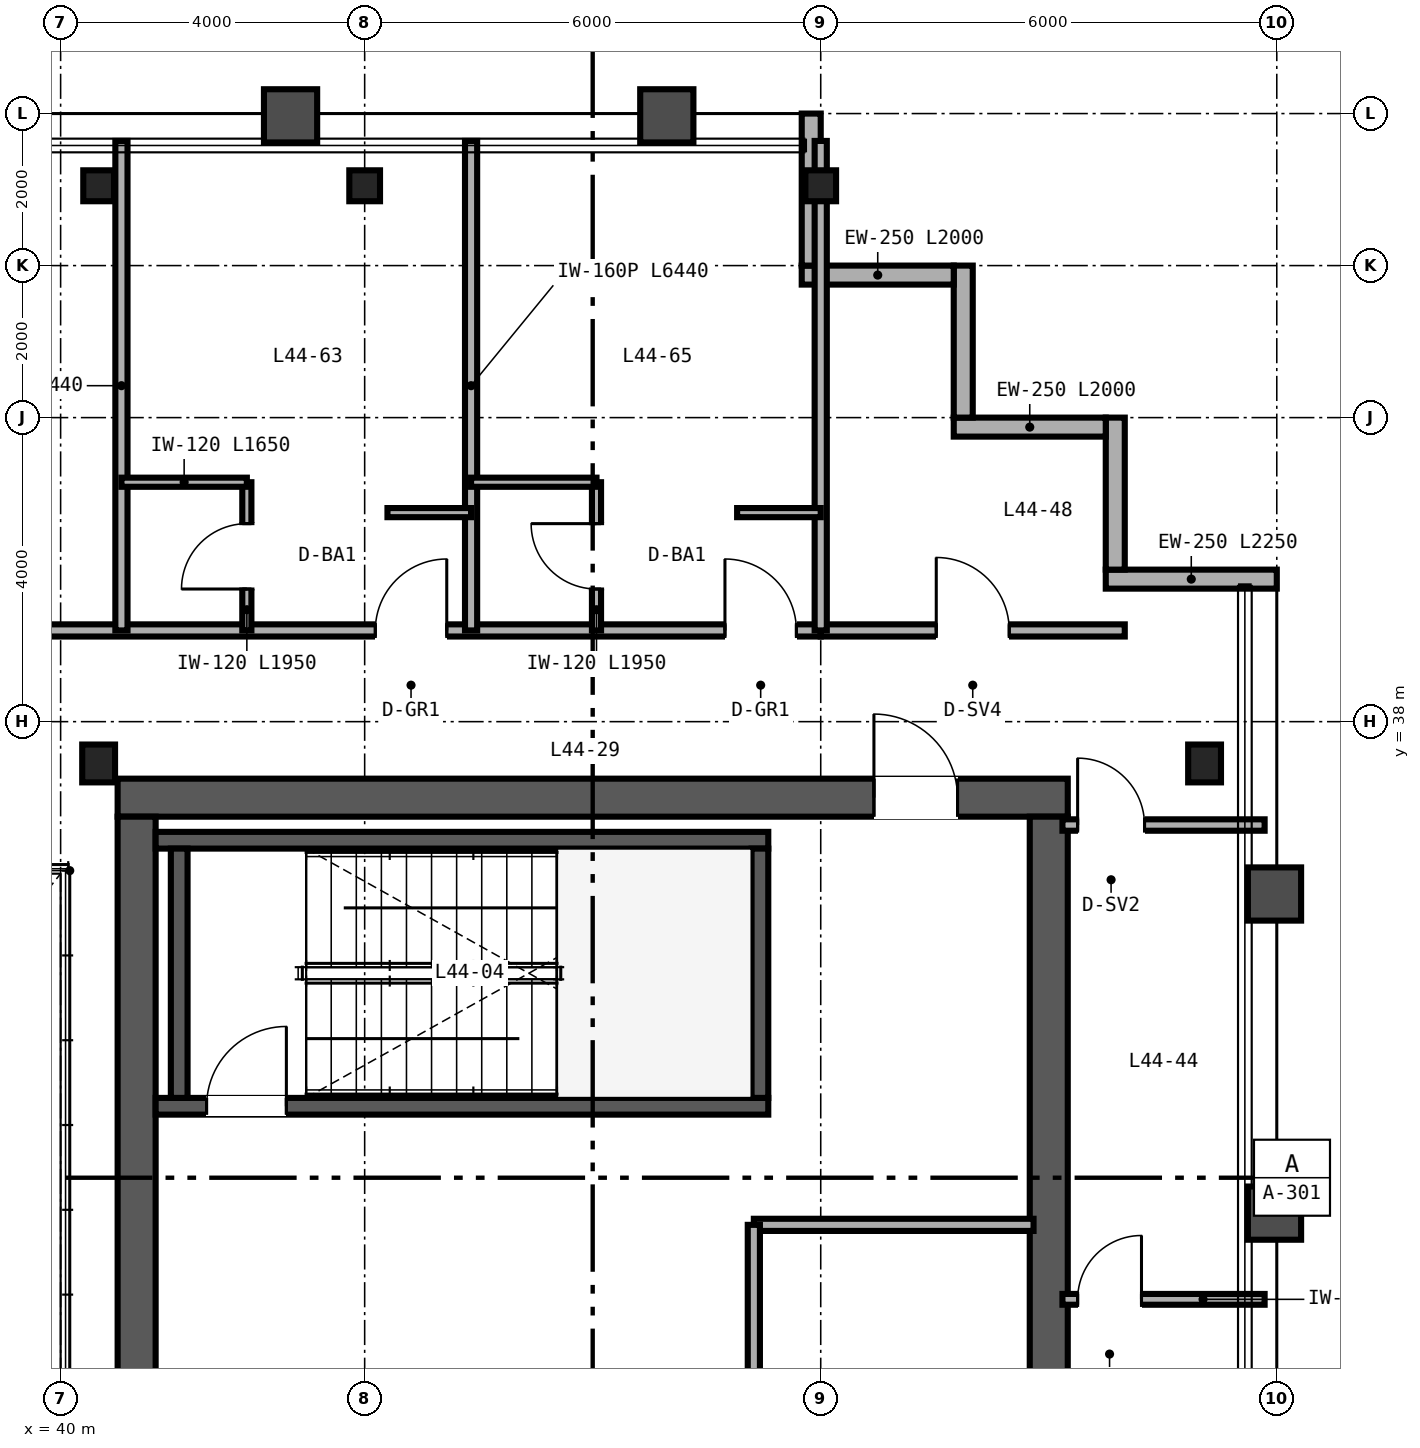
"""IFC4 building model, lengths in metres.
Left out: names, types, materials, properties, quantities, classifications, styles, units other than length and angle.
Written with IfcOpenShell. Run it as: python <this file> out.ifc"""

import sys

from ifc_helpers import new_model, si_unit, direction, frame, frame_2d, origin, origin_2d, place, context, subcontext, project, spatial, rectangle, i_section, extrude, source, transform, mapped, element, fill, save


model = new_model("IFC4")
c1 = context("Model", 3, precision=1e-05, world=origin(), true_north=direction((0.0, 1.0)))
c2 = subcontext(c1, "Body", "Model", "MODEL_VIEW")
j1 = project(units=[si_unit("LENGTHUNIT", "METRE"), si_unit("PLANEANGLEUNIT", "RADIAN")], contexts=[c1])
p1 = place(None, origin())
s1 = spatial("IfcSite", under=j1, at=p1, CompositionType="ELEMENT")
p2 = place(p1, origin())
s2 = spatial("IfcBuilding", under=s1, at=p2, CompositionType="ELEMENT")
p3 = place(p2, frame((0.0, 0.0, 177.6)))
s3 = spatial("IfcBuildingStorey", under=s2, at=p3, CompositionType="ELEMENT", Elevation=177.6)
p4 = place(p3, frame((40.75, 37.0, 0.0), z_axis=(0.0, 0.0, 1.0), x_axis=(1.0, 0.0, 0.0)))
e1 = element("IfcWall", 1, at=p4, inside=s3, PredefinedType="SHEAR", context=c2, shape_type="SweptSolid", body=[
    extrude(rectangle(XDim=12.5, YDim=0.5, at=frame_2d((6.25, 0.0))), origin(), (0.0, 0.0, 1.0), 3.37),
])
p5 = place(p4, frame((9.95, 0.0, 0.0)))
e2 = element("IfcOpeningElement", 2, at=p5, cuts=e1, PredefinedType="OPENING", context=c2, shape_type="SweptSolid", body=[
    extrude(rectangle(XDim=1.1, YDim=2.15, at=frame_2d((0.55, 1.075))), frame((0.0, 0.26, 0.0), z_axis=(0.0, -1.0, 0.0), x_axis=(1.0, 0.0, 0.0)), (0.0, 0.0, 1.0), 0.52),
])
for number, where, z_axis, x_axis in (
    (3, (41.0, 15.25, 0.0), (0.0, 0.0, 1.0), (0.0, 1.0, 0.0)),
    (4, (53.0, 15.25, 0.0), (0.0, 0.0, 1.0), (0.0, 1.0, 0.0)),
):
    element("IfcWall", number, at=place(p3, frame(where, z_axis=z_axis, x_axis=x_axis)), inside=s3, PredefinedType="SHEAR", context=c2, shape_type="SweptSolid", body=[
        extrude(rectangle(XDim=21.5, YDim=0.5, at=frame_2d((10.75, 0.0))), origin(), (0.0, 0.0, 1.0), 3.37),
    ])
p6 = place(p3, frame((41.25, 32.94, 0.0), z_axis=(0.0, 0.0, 1.0), x_axis=(1.0, 0.0, 0.0)))
e5 = element("IfcWall", 5, at=p6, inside=s3, PredefinedType="SHEAR", context=c2, shape_type="SweptSolid", body=[
    extrude(rectangle(XDim=8.06, YDim=0.22, at=frame_2d((4.03, 0.0))), origin(), (0.0, 0.0, 1.0), 3.4),
])
p7 = place(p6, frame((0.67, 0.0, 0.0)))
e6 = element("IfcOpeningElement", 6, at=p7, cuts=e5, PredefinedType="OPENING", context=c2, shape_type="SweptSolid", body=[
    extrude(rectangle(XDim=1.05, YDim=2.15, at=frame_2d((0.525, 1.075))), frame((0.0, 0.12, 0.0), z_axis=(0.0, -1.0, 0.0), x_axis=(1.0, 0.0, 0.0)), (0.0, 0.0, 1.0), 0.24),
])
p8 = place(p3, frame((41.25, 36.44, 0.0), z_axis=(0.0, 0.0, 1.0), x_axis=(1.0, 0.0, 0.0)))
e7 = element("IfcWall", 7, at=p8, inside=s3, PredefinedType="SHEAR", context=c2, shape_type="SweptSolid", body=[
    extrude(rectangle(XDim=8.06, YDim=0.22, at=frame_2d((4.03, 0.0))), origin(), (0.0, 0.0, 1.0), 3.4),
])
for number, where, z_axis, x_axis in (
    (8, (41.56, 33.05, 0.0), (0.0, 0.0, 1.0), (0.0, 1.0, 0.0)),
    (9, (49.2, 33.05, 0.0), (0.0, 0.0, 1.0), (0.0, 1.0, 0.0)),
):
    element("IfcWall", number, at=place(p3, frame(where, z_axis=z_axis, x_axis=x_axis)), inside=s3, PredefinedType="SHEAR", context=c2, shape_type="SweptSolid", body=[
        extrude(rectangle(XDim=3.28, YDim=0.22, at=frame_2d((1.64, 0.0))), origin(), (0.0, 0.0, 1.0), 3.4),
    ])
m1 = source(origin(), c2, "Body", "SweptSolid", [
    extrude(i_section(OverallWidth=0.432, OverallDepth=0.498, WebThickness=0.056, FlangeThickness=0.089, FilletRadius=0.025, at=origin_2d()), origin(), (0.0, 0.0, 1.0), 3.37),
])
for number, where, z_axis, x_axis in (
    (10, (40.5, 37.45, 0.0), (0.0, 0.0, 1.0), (1.0, 0.0, 0.0)),
    (11, (55.05, 37.45, 0.0), (0.0, 0.0, 1.0), (1.0, 0.0, 0.0)),
):
    element("IfcColumn", number, at=place(p3, frame(where, z_axis=z_axis, x_axis=x_axis)), inside=s3, PredefinedType="COLUMN", context=c2, shape_type="MappedRepresentation", body=[
        mapped(m1, transform((0.0, 0.0, 0.0), scale=1.0)),
    ])
m2 = source(origin(), c2, "Body", "SweptSolid", [
    extrude(i_section(OverallWidth=0.404, OverallDepth=0.407, WebThickness=0.027, FlangeThickness=0.044, FilletRadius=0.025, at=origin_2d()), origin(), (0.0, 0.0, 1.0), 3.37),
])
for number, where, z_axis, x_axis in (
    (12, (40.5, 45.05, 0.0), (0.0, 0.0, 1.0), (1.0, 0.0, 0.0)),
    (13, (44.0, 45.05, 0.0), (0.0, 0.0, 1.0), (1.0, 0.0, 0.0)),
    (14, (50.0, 45.05, 0.0), (0.0, 0.0, 1.0), (1.0, 0.0, 0.0)),
):
    element("IfcColumn", number, at=place(p3, frame(where, z_axis=z_axis, x_axis=x_axis)), inside=s3, PredefinedType="COLUMN", context=c2, shape_type="MappedRepresentation", body=[
        mapped(m2, transform((0.0, 0.0, 0.0), scale=1.0)),
    ])
p9 = place(p3, frame((56.0, 39.875, 0.0), z_axis=(0.0, 0.0, 1.0), x_axis=(-1.0, 0.0, 0.0)))
e15 = element("IfcWall", 15, at=p9, inside=s3, PredefinedType="SOLIDWALL", context=c2, shape_type="SweptSolid", body=[
    extrude(rectangle(XDim=2.25, YDim=0.25, at=frame_2d((1.125, 0.0))), origin(), (0.0, 0.0, 1.0), 3.37),
])
for number, where, z_axis, x_axis in (
    (16, (53.875, 40.0, 0.0), (0.0, 0.0, 1.0), (0.0, 1.0, 0.0)),
    (17, (53.75, 41.875, 0.0), (0.0, 0.0, 1.0), (-1.0, 0.0, 0.0)),
    (18, (51.875, 42.0, 0.0), (0.0, 0.0, 1.0), (0.0, 1.0, 0.0)),
    (19, (51.75, 43.875, 0.0), (0.0, 0.0, 1.0), (-1.0, 0.0, 0.0)),
):
    element("IfcWall", number, at=place(p3, frame(where, z_axis=z_axis, x_axis=x_axis)), inside=s3, PredefinedType="SOLIDWALL", context=c2, shape_type="SweptSolid", body=[
        extrude(rectangle(XDim=2.0, YDim=0.25, at=frame_2d((1.0, 0.0))), origin(), (0.0, 0.0, 1.0), 3.37),
    ])
p10 = place(p3, frame((49.875, 44.0, 0.0), z_axis=(0.0, 0.0, 1.0), x_axis=(0.0, 1.0, 0.0)))
e20 = element("IfcWall", 20, at=p10, inside=s3, PredefinedType="SOLIDWALL", context=c2, shape_type="SweptSolid", body=[
    extrude(rectangle(XDim=2.0, YDim=0.25, at=frame_2d((1.0, 0.0))), origin(), (0.0, 0.0, 1.0), 2.677),
])
p11 = place(p3, frame((49.12, 31.38, 0.0), z_axis=(0.0, 0.0, 1.0), x_axis=(1.0, 0.0, 0.0)))
e21 = element("IfcWall", 21, at=p11, inside=s3, PredefinedType="PARTITIONING", context=c2, shape_type="SweptSolid", body=[
    extrude(rectangle(XDim=3.68, YDim=0.16, at=frame_2d((1.84, 0.0))), origin(), (0.0, 0.0, 1.0), 2.47),
])
p12 = place(p3, frame((49.12, 15.25, 0.0), z_axis=(0.0, 0.0, 1.0), x_axis=(0.0, 1.0, 0.0)))
e22 = element("IfcWall", 22, at=p12, inside=s3, PredefinedType="PARTITIONING", context=c2, shape_type="SweptSolid", body=[
    extrude(rectangle(XDim=16.13, YDim=0.16, at=frame_2d((8.065, 0.0))), origin(), (0.0, 0.0, 1.0), 2.443),
])
p13 = place(p12, frame((3.8, 0.0, 0.0)))
e23 = element("IfcOpeningElement", 23, at=p13, cuts=e22, PredefinedType="OPENING", context=c2, shape_type="SweptSolid", body=[
    extrude(rectangle(XDim=0.92, YDim=2.15, at=frame_2d((0.46, 1.075))), frame((0.0, 0.09, 0.0), z_axis=(0.0, -1.0, 0.0), x_axis=(1.0, 0.0, 0.0)), (0.0, 0.0, 1.0), 0.18),
])
p14 = place(p12, frame((11.8, 0.0, 0.0)))
e24 = element("IfcOpeningElement", 24, at=p14, cuts=e22, PredefinedType="OPENING", context=c2, shape_type="SweptSolid", body=[
    extrude(rectangle(XDim=0.9, YDim=2.15, at=frame_2d((0.45, 1.075))), frame((0.0, 0.09, 0.0), z_axis=(0.0, -1.0, 0.0), x_axis=(1.0, 0.0, 0.0)), (0.0, 0.0, 1.0), 0.18),
])
p15 = place(p3, frame((53.18, 36.64, 0.0), z_axis=(0.0, 0.0, 1.0), x_axis=(1.0, 0.0, 0.0)))
e25 = element("IfcWall", 25, at=p15, inside=s3, PredefinedType="PARTITIONING", context=c2, shape_type="SweptSolid", body=[
    extrude(rectangle(XDim=2.66, YDim=0.15, at=frame_2d((1.33, 0.0))), origin(), (0.0, 0.0, 1.0), 2.753),
])
p16 = place(p15, frame((0.2, 0.0, 0.0)))
e26 = element("IfcOpeningElement", 26, at=p16, cuts=e25, PredefinedType="OPENING", context=c2, shape_type="SweptSolid", body=[
    extrude(rectangle(XDim=0.88, YDim=2.15, at=frame_2d((0.44, 1.075))), frame((0.0, 0.085, 0.0), z_axis=(0.0, -1.0, 0.0), x_axis=(1.0, 0.0, 0.0)), (0.0, 0.0, 1.0), 0.17),
])
p17 = place(p3, frame((53.18, 30.4, 0.0), z_axis=(0.0, 0.0, 1.0), x_axis=(1.0, 0.0, 0.0)))
e27 = element("IfcWall", 27, at=p17, inside=s3, PredefinedType="PARTITIONING", context=c2, shape_type="SweptSolid", body=[
    extrude(rectangle(XDim=2.66, YDim=0.142, at=frame_2d((1.33, 0.0))), origin(), (0.0, 0.0, 1.0), 2.753),
])
p18 = place(p17, frame((0.2, 0.0, 0.0)))
e28 = element("IfcOpeningElement", 28, at=p18, cuts=e27, PredefinedType="OPENING", context=c2, shape_type="SweptSolid", body=[
    extrude(rectangle(XDim=0.84, YDim=2.1, at=frame_2d((0.42, 1.05))), frame((0.0, 0.081, 0.0), z_axis=(0.0, -1.0, 0.0), x_axis=(1.0, 0.0, 0.0)), (0.0, 0.0, 1.0), 0.162),
])
p19 = place(p3, frame((50.0, 39.2, 0.0), z_axis=(0.0, 0.0, 1.0), x_axis=(1.0, 0.0, 0.0)))
e29 = element("IfcWall", 29, at=p19, inside=s3, PredefinedType="PARTITIONING", context=c2, shape_type="SweptSolid", body=[
    extrude(rectangle(XDim=4.0, YDim=0.16, at=frame_2d((2.0, 0.0))), origin(), (0.0, 0.0, 1.0), 3.37),
])
p20 = place(p19, frame((1.52, 0.0, 0.0)))
e30 = element("IfcOpeningElement", 30, at=p20, cuts=e29, PredefinedType="OPENING", context=c2, shape_type="SweptSolid", body=[
    extrude(rectangle(XDim=0.96, YDim=2.15, at=frame_2d((0.48, 1.075))), frame((0.0, 0.09, 0.0), z_axis=(0.0, -1.0, 0.0), x_axis=(1.0, 0.0, 0.0)), (0.0, 0.0, 1.0), 0.18),
])
p21 = place(p3, frame((14.0, 39.2, 0.0), z_axis=(0.0, 0.0, 1.0), x_axis=(1.0, 0.0, 0.0)))
e31 = element("IfcWall", 31, at=p21, inside=s3, PredefinedType="PARTITIONING", context=c2, shape_type="SweptSolid", body=[
    extrude(rectangle(XDim=36.0, YDim=0.16, at=frame_2d((18.0, 0.0))), origin(), (0.0, 0.0, 1.0), 2.913),
])
p22 = place(p21, frame((7.5, 0.0, 0.0)))
e32 = element("IfcOpeningElement", 32, at=p22, cuts=e31, PredefinedType="OPENING", context=c2, shape_type="SweptSolid", body=[
    extrude(rectangle(XDim=0.98, YDim=2.2, at=frame_2d((0.49, 1.1))), frame((0.0, 0.09, 0.0), z_axis=(0.0, -1.0, 0.0), x_axis=(1.0, 0.0, 0.0)), (0.0, 0.0, 1.0), 0.18),
])
p23 = place(p21, frame((16.5, 0.0, 0.0)))
e33 = element("IfcOpeningElement", 33, at=p23, cuts=e31, PredefinedType="OPENING", context=c2, shape_type="SweptSolid", body=[
    extrude(rectangle(XDim=0.98, YDim=2.2, at=frame_2d((0.49, 1.1))), frame((0.0, 0.09, 0.0), z_axis=(0.0, -1.0, 0.0), x_axis=(1.0, 0.0, 0.0)), (0.0, 0.0, 1.0), 0.18),
])
p24 = place(p21, frame((21.82, 0.0, 0.0)))
e34 = element("IfcOpeningElement", 34, at=p24, cuts=e31, PredefinedType="OPENING", context=c2, shape_type="SweptSolid", body=[
    extrude(rectangle(XDim=0.96, YDim=2.15, at=frame_2d((0.48, 1.075))), frame((0.0, 0.09, 0.0), z_axis=(0.0, -1.0, 0.0), x_axis=(1.0, 0.0, 0.0)), (0.0, 0.0, 1.0), 0.18),
])
p25 = place(p21, frame((30.14, 0.0, 0.0)))
e35 = element("IfcOpeningElement", 35, at=p25, cuts=e31, PredefinedType="OPENING", context=c2, shape_type="SweptSolid", body=[
    extrude(rectangle(XDim=0.94, YDim=2.15, at=frame_2d((0.47, 1.075))), frame((0.0, 0.09, 0.0), z_axis=(0.0, -1.0, 0.0), x_axis=(1.0, 0.0, 0.0)), (0.0, 0.0, 1.0), 0.18),
])
p26 = place(p21, frame((34.74, 0.0, 0.0)))
e36 = element("IfcOpeningElement", 36, at=p26, cuts=e31, PredefinedType="OPENING", context=c2, shape_type="SweptSolid", body=[
    extrude(rectangle(XDim=0.94, YDim=2.15, at=frame_2d((0.47, 1.075))), frame((0.0, 0.09, 0.0), z_axis=(0.0, -1.0, 0.0), x_axis=(1.0, 0.0, 0.0)), (0.0, 0.0, 1.0), 0.18),
])
p27 = place(p3, frame((50.0, 39.2, 0.0), z_axis=(0.0, 0.0, 1.0), x_axis=(0.0, 1.0, 0.0)))
e37 = element("IfcWall", 37, at=p27, inside=s3, PredefinedType="PARTITIONING", context=c2, shape_type="SweptSolid", body=[
    extrude(rectangle(XDim=6.44, YDim=0.16, at=frame_2d((3.22, 0.0))), origin(), (0.0, 0.0, 1.0), 2.677),
])
p28 = place(p3, frame((40.8, 39.2, 0.0), z_axis=(0.0, 0.0, 1.0), x_axis=(0.0, 1.0, 0.0)))
e38 = element("IfcWall", 38, at=p28, inside=s3, PredefinedType="PARTITIONING", context=c2, shape_type="SweptSolid", body=[
    extrude(rectangle(XDim=6.44, YDim=0.16, at=frame_2d((3.22, 0.0))), origin(), (0.0, 0.0, 1.0), 2.443),
])
p29 = place(p3, frame((45.4, 39.2, 0.0), z_axis=(0.0, 0.0, 1.0), x_axis=(0.0, 1.0, 0.0)))
e39 = element("IfcWall", 39, at=p29, inside=s3, PredefinedType="PARTITIONING", context=c2, shape_type="SweptSolid", body=[
    extrude(rectangle(XDim=6.44, YDim=0.16, at=frame_2d((3.22, 0.0))), origin(), (0.0, 0.0, 1.0), 2.677),
])
p30 = place(p3, frame((42.45, 39.2, 0.0), z_axis=(0.0, 0.0, 1.0), x_axis=(0.0, 1.0, 0.0)))
e40 = element("IfcWall", 40, at=p30, inside=s3, PredefinedType="PARTITIONING", context=c2, shape_type="SweptSolid", body=[
    extrude(rectangle(XDim=1.95, YDim=0.12, at=frame_2d((0.975, 0.0))), origin(), (0.0, 0.0, 1.0), 3.37),
])
p31 = place(p30, frame((0.545, 0.0, 0.0)))
e41 = element("IfcOpeningElement", 41, at=p31, cuts=e40, PredefinedType="OPENING", context=c2, shape_type="SweptSolid", body=[
    extrude(rectangle(XDim=0.86, YDim=2.1, at=frame_2d((0.43, 1.05))), frame((0.0, 0.07, 0.0), z_axis=(0.0, -1.0, 0.0), x_axis=(1.0, 0.0, 0.0)), (0.0, 0.0, 1.0), 0.14),
])
p32 = place(p3, frame((40.8, 41.15, 0.0), z_axis=(0.0, 0.0, 1.0), x_axis=(1.0, 0.0, 0.0)))
e42 = element("IfcWall", 42, at=p32, inside=s3, PredefinedType="PARTITIONING", context=c2, shape_type="SweptSolid", body=[
    extrude(rectangle(XDim=1.65, YDim=0.12, at=frame_2d((0.825, 0.0))), origin(), (0.0, 0.0, 1.0), 3.37),
])
p33 = place(p3, frame((44.3, 40.75, 0.0), z_axis=(0.0, 0.0, 1.0), x_axis=(1.0, 0.0, 0.0)))
e43 = element("IfcWall", 43, at=p33, inside=s3, PredefinedType="PARTITIONING", context=c2, shape_type="SweptSolid", body=[
    extrude(rectangle(XDim=1.1, YDim=0.12, at=frame_2d((0.55, 0.0))), origin(), (0.0, 0.0, 1.0), 3.37),
])
p34 = place(p3, frame((47.05, 39.2, 0.0), z_axis=(0.0, 0.0, 1.0), x_axis=(0.0, 1.0, 0.0)))
e44 = element("IfcWall", 44, at=p34, inside=s3, PredefinedType="PARTITIONING", context=c2, shape_type="SweptSolid", body=[
    extrude(rectangle(XDim=1.95, YDim=0.12, at=frame_2d((0.975, 0.0))), origin(), (0.0, 0.0, 1.0), 3.37),
])
p35 = place(p34, frame((0.545, 0.0, 0.0)))
e45 = element("IfcOpeningElement", 45, at=p35, cuts=e44, PredefinedType="OPENING", context=c2, shape_type="SweptSolid", body=[
    extrude(rectangle(XDim=0.86, YDim=2.1, at=frame_2d((0.43, 1.05))), frame((0.0, 0.07, 0.0), z_axis=(0.0, -1.0, 0.0), x_axis=(1.0, 0.0, 0.0)), (0.0, 0.0, 1.0), 0.14),
])
p36 = place(p3, frame((45.4, 41.15, 0.0), z_axis=(0.0, 0.0, 1.0), x_axis=(1.0, 0.0, 0.0)))
e46 = element("IfcWall", 46, at=p36, inside=s3, PredefinedType="PARTITIONING", context=c2, shape_type="SweptSolid", body=[
    extrude(rectangle(XDim=1.65, YDim=0.12, at=frame_2d((0.825, 0.0))), origin(), (0.0, 0.0, 1.0), 3.37),
])
p37 = place(p3, frame((48.9, 40.75, 0.0), z_axis=(0.0, 0.0, 1.0), x_axis=(1.0, 0.0, 0.0)))
e47 = element("IfcWall", 47, at=p37, inside=s3, PredefinedType="PARTITIONING", context=c2, shape_type="SweptSolid", body=[
    extrude(rectangle(XDim=1.1, YDim=0.12, at=frame_2d((0.55, 0.0))), origin(), (0.0, 0.0, 1.0), 3.37),
])
m3 = source(origin(), c2, "Body", "SweptSolid", [
    extrude(rectangle(XDim=1.05, YDim=2.15, at=frame_2d((0.525, 1.075))), frame((0.0, 0.025, 0.0), z_axis=(0.0, -1.0, 0.0), x_axis=(1.0, 0.0, 0.0)), (0.0, 0.0, 1.0), 0.05),
])
p38 = place(p7, origin())
e48 = element("IfcDoor", 48, at=p38, inside=s3, OperationType="SINGLE_SWING_RIGHT", PredefinedType="DOOR", context=c2, shape_type="MappedRepresentation", body=[
    mapped(m3, transform((0.0, 0.0, 0.0), scale=1.0)),
])
fill(e6, e48)
m4 = source(origin(), c2, "Body", "SweptSolid", [
    extrude(rectangle(XDim=1.1, YDim=2.15, at=frame_2d((0.55, 1.075))), frame((0.0, 0.025, 0.0), z_axis=(0.0, -1.0, 0.0), x_axis=(1.0, 0.0, 0.0)), (0.0, 0.0, 1.0), 0.05),
])
p39 = place(p5, origin())
e49 = element("IfcDoor", 49, at=p39, inside=s3, OperationType="SINGLE_SWING_LEFT", PredefinedType="DOOR", context=c2, shape_type="MappedRepresentation", body=[
    mapped(m4, transform((0.0, 0.0, 0.0), scale=1.0)),
])
fill(e2, e49)
m5 = source(origin(), c2, "Body", "SweptSolid", [
    extrude(rectangle(XDim=0.88, YDim=2.15, at=frame_2d((0.44, 1.075))), frame((0.0, 0.025, 0.0), z_axis=(0.0, -1.0, 0.0), x_axis=(1.0, 0.0, 0.0)), (0.0, 0.0, 1.0), 0.05),
])
p40 = place(p16, origin())
e50 = element("IfcDoor", 50, at=p40, inside=s3, OperationType="SINGLE_SWING_LEFT", PredefinedType="DOOR", context=c2, shape_type="MappedRepresentation", body=[
    mapped(m5, transform((0.0, 0.0, 0.0), scale=1.0)),
])
fill(e26, e50)
m6 = source(origin(), c2, "Body", "SweptSolid", [
    extrude(rectangle(XDim=0.84, YDim=2.1, at=frame_2d((0.42, 1.05))), frame((0.0, 0.025, 0.0), z_axis=(0.0, -1.0, 0.0), x_axis=(1.0, 0.0, 0.0)), (0.0, 0.0, 1.0), 0.05),
])
p41 = place(p18, origin())
e51 = element("IfcDoor", 51, at=p41, inside=s3, OperationType="SINGLE_SWING_RIGHT", PredefinedType="DOOR", context=c2, shape_type="MappedRepresentation", body=[
    mapped(m6, transform((0.0, 0.0, 0.0), scale=1.0)),
])
fill(e28, e51)
m7 = source(origin(), c2, "Body", "SweptSolid", [
    extrude(rectangle(XDim=0.96, YDim=2.15, at=frame_2d((0.48, 1.075))), frame((0.0, 0.025, 0.0), z_axis=(0.0, -1.0, 0.0), x_axis=(1.0, 0.0, 0.0)), (0.0, 0.0, 1.0), 0.05),
])
p42 = place(p20, origin())
e52 = element("IfcDoor", 52, at=p42, inside=s3, OperationType="SINGLE_SWING_LEFT", PredefinedType="DOOR", context=c2, shape_type="MappedRepresentation", body=[
    mapped(m7, transform((0.0, 0.0, 0.0), scale=1.0)),
])
fill(e30, e52)
m8 = source(origin(), c2, "Body", "SweptSolid", [
    extrude(rectangle(XDim=0.86, YDim=2.1, at=frame_2d((0.43, 1.05))), frame((0.0, 0.025, 0.0), z_axis=(0.0, -1.0, 0.0), x_axis=(1.0, 0.0, 0.0)), (0.0, 0.0, 1.0), 0.05),
])
p43 = place(p31, origin())
e53 = element("IfcDoor", 53, at=p43, inside=s3, OperationType="SINGLE_SWING_LEFT", PredefinedType="DOOR", context=c2, shape_type="MappedRepresentation", body=[
    mapped(m8, transform((0.0, 0.0, 0.0), scale=1.0)),
])
fill(e41, e53)
p44 = place(p35, origin())
e54 = element("IfcDoor", 54, at=p44, inside=s3, OperationType="SINGLE_SWING_RIGHT", PredefinedType="DOOR", context=c2, shape_type="MappedRepresentation", body=[
    mapped(m8, transform((0.0, 0.0, 0.0), scale=1.0)),
])
fill(e45, e54)
m9 = source(origin(), c2, "Body", "SweptSolid", [
    extrude(rectangle(XDim=0.94, YDim=2.15, at=frame_2d((0.47, 1.075))), frame((0.0, 0.025, 0.0), z_axis=(0.0, -1.0, 0.0), x_axis=(1.0, 0.0, 0.0)), (0.0, 0.0, 1.0), 0.05),
])
p45 = place(p25, origin())
e55 = element("IfcDoor", 55, at=p45, inside=s3, OperationType="SINGLE_SWING_RIGHT", PredefinedType="DOOR", context=c2, shape_type="MappedRepresentation", body=[
    mapped(m9, transform((0.0, 0.0, 0.0), scale=1.0)),
])
fill(e35, e55)
p46 = place(p26, origin())
e56 = element("IfcDoor", 56, at=p46, inside=s3, OperationType="SINGLE_SWING_LEFT", PredefinedType="DOOR", context=c2, shape_type="MappedRepresentation", body=[
    mapped(m9, transform((0.0, 0.0, 0.0), scale=1.0)),
])
fill(e36, e56)
save(model, sys.argv[1])
